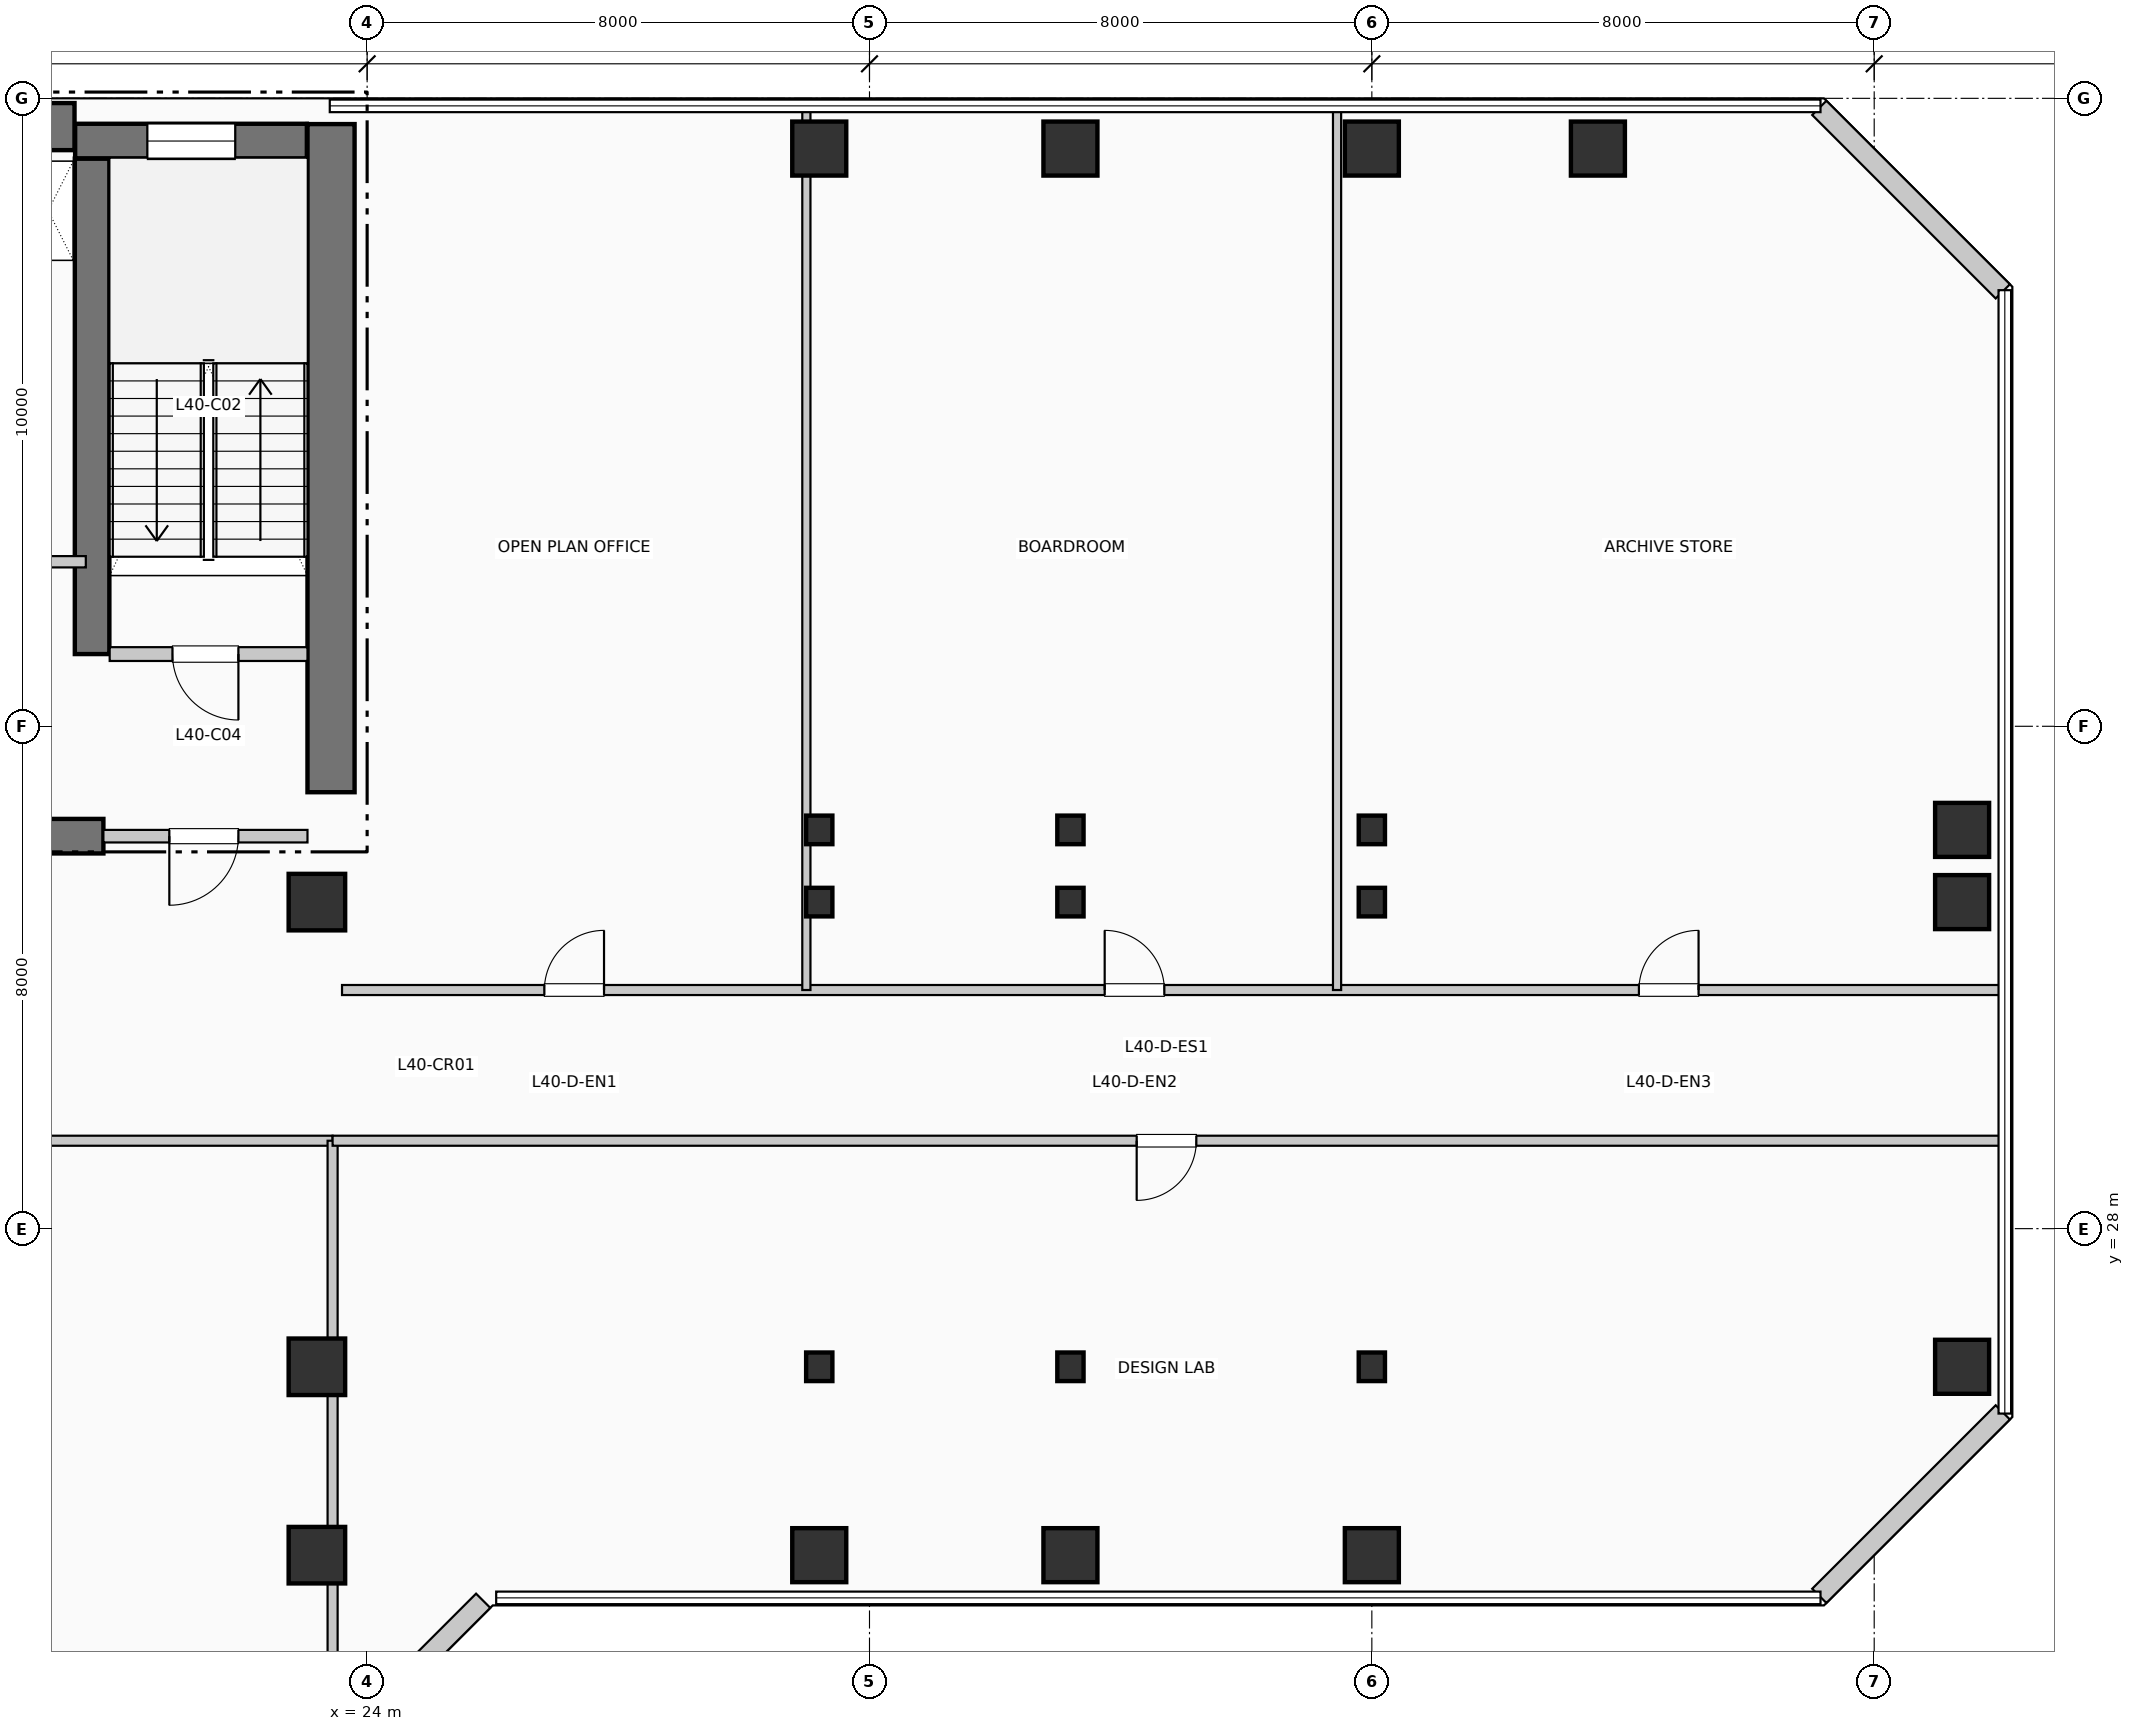
"""IFC4 building model, lengths in metres.
Left out: names, types, materials, properties, quantities, classifications, styles, units other than length and angle.
Written with IfcOpenShell. Run it as: python <this file> out.ifc"""

import sys

from ifc_helpers import new_model, si_unit, direction, frame, frame_2d, origin, origin_2d, place, context, subcontext, project, spatial, rectangle, i_section, extrude, element, fill, save


model = new_model("IFC4")
c1 = context("Model", 3, precision=1e-05, world=origin(), true_north=direction((0.0, 1.0)))
c2 = subcontext(c1, "Body", "Model", "MODEL_VIEW")
j1 = project(units=[si_unit("LENGTHUNIT", "METRE"), si_unit("PLANEANGLEUNIT", "RADIAN")], contexts=[c1])
p1 = place(None, origin())
s1 = spatial("IfcSite", under=j1, at=p1, CompositionType="ELEMENT")
p2 = place(p1, origin())
s2 = spatial("IfcBuilding", under=s1, at=p2, CompositionType="ELEMENT")
p3 = place(p2, frame((0.0, 0.0, 166.65)))
s3 = spatial("IfcBuildingStorey", under=s2, at=p3, CompositionType="ELEMENT", Elevation=166.65)
p4 = place(p3, frame((5.36, 45.55, 0.0), z_axis=(0.0, 0.0, 1.0), x_axis=(1.0, 0.0, 0.0)))
e1 = element("IfcWall", 1, at=p4, inside=s3, PredefinedType="SHEAR", context=c2, shape_type="SweptSolid", body=[
    extrude(rectangle(XDim=13.98, YDim=0.75, at=frame_2d((6.99, 0.0))), origin(), (0.0, 0.0, 1.0), 3.96),
])
p5 = place(p3, frame((23.425, 34.95, 0.0), z_axis=(0.0, 0.0, 1.0), x_axis=(0.0, 1.0, 0.0)))
e2 = element("IfcWall", 2, at=p5, inside=s3, PredefinedType="SHEAR", context=c2, shape_type="SweptSolid", body=[
    extrude(rectangle(XDim=10.64, YDim=0.75, at=frame_2d((5.32, 0.0))), origin(), (0.0, 0.0, 1.0), 3.96),
])
p6 = place(p3, frame((13.68, 34.25, 0.0), z_axis=(0.0, 0.0, 1.0), x_axis=(1.0, 0.0, 0.0)))
e3 = element("IfcWall", 3, at=p6, inside=s3, PredefinedType="SHEAR", context=c2, shape_type="SweptSolid", body=[
    extrude(rectangle(XDim=6.12, YDim=0.55, at=frame_2d((3.06, 0.0))), origin(), (0.0, 0.0, 1.0), 3.96),
])
p7 = place(p3, frame((19.62, 37.15, 0.0), z_axis=(0.0, 0.0, 1.0), x_axis=(0.0, 1.0, 0.0)))
e4 = element("IfcWall", 4, at=p7, inside=s3, PredefinedType="SHEAR", context=c2, shape_type="SweptSolid", body=[
    extrude(rectangle(XDim=7.89, YDim=0.55, at=frame_2d((3.945, 0.0))), origin(), (0.0, 0.0, 1.0), 3.96),
])
p8 = place(p3, frame((19.35, 45.32, 0.0), z_axis=(0.0, 0.0, 1.0), x_axis=(1.0, 0.0, 0.0)))
e5 = element("IfcWall", 5, at=p8, inside=s3, PredefinedType="SHEAR", context=c2, shape_type="SweptSolid", body=[
    extrude(rectangle(XDim=3.69, YDim=0.55, at=frame_2d((1.845, 0.0))), origin(), (0.0, 0.0, 1.0), 3.96),
])
p9 = place(p8, frame((1.15, 0.0, 1.05)))
e6 = element("IfcOpeningElement", 6, at=p9, cuts=e5, PredefinedType="OPENING", context=c2, shape_type="SweptSolid", body=[
    extrude(rectangle(XDim=1.4, YDim=1.8, at=frame_2d((0.7, 0.9))), frame((0.0, 0.285, 0.0), z_axis=(0.0, -1.0, 0.0), x_axis=(1.0, 0.0, 0.0)), (0.0, 0.0, 1.0), 0.57),
])
for number, where, z_axis, x_axis in (
    (7, (23.2, 22.8, 0.0), (0.0, 0.0, 1.0), (1.0, 0.0, 0.0)),
    (8, (23.2, 25.8, 0.0), (0.0, 0.0, 1.0), (1.0, 0.0, 0.0)),
    (9, (23.2, 33.2, 0.0), (0.0, 0.0, 1.0), (1.0, 0.0, 0.0)),
):
    element("IfcColumn", number, at=place(p3, frame(where, z_axis=z_axis, x_axis=x_axis)), inside=s3, PredefinedType="COLUMN", context=c2, shape_type="SweptSolid", body=[
        extrude(rectangle(XDim=0.9, YDim=0.9, at=origin_2d()), origin(), (0.0, 0.0, 1.0), 3.96),
    ])
p10 = place(p3, frame((31.2, 22.8, 0.0), z_axis=(0.0, 0.0, 1.0), x_axis=(1.0, 0.0, 0.0)))
e10 = element("IfcColumn", 10, at=p10, inside=s3, PredefinedType="COLUMN", context=c2, shape_type="SweptSolid", body=[
    extrude(rectangle(XDim=0.86, YDim=0.86, at=origin_2d()), origin(), (0.0, 0.0, 1.0), 3.96),
])
for number, where, z_axis, x_axis in (
    (11, (31.2, 25.8, 0.0), (0.0, 0.0, 1.0), (1.0, 0.0, 0.0)),
    (12, (31.2, 33.2, 0.0), (0.0, 0.0, 1.0), (1.0, 0.0, 0.0)),
    (13, (31.2, 34.35, 0.0), (0.0, 0.0, 1.0), (1.0, 0.0, 0.0)),
):
    element("IfcColumn", number, at=place(p3, frame(where, z_axis=z_axis, x_axis=x_axis)), inside=s3, PredefinedType="COLUMN", context=c2, shape_type="SweptSolid", body=[
        extrude(i_section(OverallWidth=0.418, OverallDepth=0.455, WebThickness=0.032, FlangeThickness=0.051, at=origin_2d()), origin(), (0.0, 0.0, 1.0), 3.96),
    ])
for number, where, z_axis, x_axis in (
    (14, (31.2, 45.2, 0.0), (0.0, 0.0, 1.0), (1.0, 0.0, 0.0)),
    (15, (35.2, 22.8, 0.0), (0.0, 0.0, 1.0), (1.0, 0.0, 0.0)),
):
    element("IfcColumn", number, at=place(p3, frame(where, z_axis=z_axis, x_axis=x_axis)), inside=s3, PredefinedType="COLUMN", context=c2, shape_type="SweptSolid", body=[
        extrude(rectangle(XDim=0.86, YDim=0.86, at=origin_2d()), origin(), (0.0, 0.0, 1.0), 3.96),
    ])
for number, where, z_axis, x_axis in (
    (16, (35.2, 25.8, 0.0), (0.0, 0.0, 1.0), (1.0, 0.0, 0.0)),
    (17, (35.2, 33.2, 0.0), (0.0, 0.0, 1.0), (1.0, 0.0, 0.0)),
    (18, (35.2, 34.35, 0.0), (0.0, 0.0, 1.0), (1.0, 0.0, 0.0)),
):
    element("IfcColumn", number, at=place(p3, frame(where, z_axis=z_axis, x_axis=x_axis)), inside=s3, PredefinedType="COLUMN", context=c2, shape_type="SweptSolid", body=[
        extrude(i_section(OverallWidth=0.418, OverallDepth=0.455, WebThickness=0.032, FlangeThickness=0.051, at=origin_2d()), origin(), (0.0, 0.0, 1.0), 3.96),
    ])
for number, where, z_axis, x_axis in (
    (19, (35.2, 45.2, 0.0), (0.0, 0.0, 1.0), (1.0, 0.0, 0.0)),
    (20, (40.0, 22.8, 0.0), (0.0, 0.0, 1.0), (1.0, 0.0, 0.0)),
):
    element("IfcColumn", number, at=place(p3, frame(where, z_axis=z_axis, x_axis=x_axis)), inside=s3, PredefinedType="COLUMN", context=c2, shape_type="SweptSolid", body=[
        extrude(rectangle(XDim=0.86, YDim=0.86, at=origin_2d()), origin(), (0.0, 0.0, 1.0), 3.96),
    ])
for number, where, z_axis, x_axis in (
    (21, (40.0, 25.8, 0.0), (0.0, 0.0, 1.0), (1.0, 0.0, 0.0)),
    (22, (40.0, 33.2, 0.0), (0.0, 0.0, 1.0), (1.0, 0.0, 0.0)),
    (23, (40.0, 34.35, 0.0), (0.0, 0.0, 1.0), (1.0, 0.0, 0.0)),
):
    element("IfcColumn", number, at=place(p3, frame(where, z_axis=z_axis, x_axis=x_axis)), inside=s3, PredefinedType="COLUMN", context=c2, shape_type="SweptSolid", body=[
        extrude(i_section(OverallWidth=0.418, OverallDepth=0.455, WebThickness=0.032, FlangeThickness=0.051, at=origin_2d()), origin(), (0.0, 0.0, 1.0), 3.96),
    ])
for number, where, z_axis, x_axis in (
    (24, (40.0, 45.2, 0.0), (0.0, 0.0, 1.0), (1.0, 0.0, 0.0)),
    (25, (43.6, 45.2, 0.0), (0.0, 0.0, 1.0), (1.0, 0.0, 0.0)),
    (26, (49.4, 25.8, 0.0), (0.0, 0.0, 1.0), (1.0, 0.0, 0.0)),
    (27, (49.4, 33.2, 0.0), (0.0, 0.0, 1.0), (1.0, 0.0, 0.0)),
    (28, (49.4, 34.35, 0.0), (0.0, 0.0, 1.0), (1.0, 0.0, 0.0)),
):
    element("IfcColumn", number, at=place(p3, frame(where, z_axis=z_axis, x_axis=x_axis)), inside=s3, PredefinedType="COLUMN", context=c2, shape_type="SweptSolid", body=[
        extrude(rectangle(XDim=0.86, YDim=0.86, at=origin_2d()), origin(), (0.0, 0.0, 1.0), 3.96),
    ])
p11 = place(p3, frame((23.926, 20.152, 0.0), z_axis=(0.0, 0.0, 1.0), x_axis=(0.707106781187, 0.707106781187, 0.0)))
e29 = element("IfcWall", 29, at=p11, inside=s3, PredefinedType="SOLIDWALL", context=c2, shape_type="SweptSolid", body=[
    extrude(rectangle(XDim=2.718, YDim=0.32, at=frame_2d((1.359, 0.0))), origin(), (0.0, 0.0, 1.0), 3.71),
])
for number, where, z_axis, x_axis in (
    (30, (47.126, 22.152, 0.0), (0.0, 0.0, 1.0), (0.707, 0.707, 0.0)),
    (31, (50.048, 42.926, 0.0), (0.0, 0.0, 1.0), (-0.707, 0.707, 0.0)),
):
    element("IfcWall", number, at=place(p3, frame(where, z_axis=z_axis, x_axis=x_axis)), inside=s3, PredefinedType="SOLIDWALL", context=c2, shape_type="SweptSolid", body=[
        extrude(rectangle(XDim=4.133, YDim=0.32, at=frame_2d((2.066, 0.0))), origin(), (0.0, 0.0, 1.0), 3.71),
    ])
p12 = place(p3, frame((19.9, 37.15, 0.0), z_axis=(0.0, 0.0, 1.0), x_axis=(1.0, 0.0, 0.0)))
e32 = element("IfcWall", 32, at=p12, inside=s3, PredefinedType="PARTITIONING", context=c2, shape_type="SweptSolid", body=[
    extrude(rectangle(XDim=3.15, YDim=0.22, at=frame_2d((1.575, 0.0))), origin(), (0.0, 0.0, 1.0), 3.71),
])
p13 = place(p12, frame((2.05, 0.0, 0.0), z_axis=(0.0, 0.0, 1.0), x_axis=(-1.0, 0.0, 0.0)))
e33 = element("IfcOpeningElement", 33, at=p13, cuts=e32, PredefinedType="OPENING", context=c2, shape_type="SweptSolid", body=[
    extrude(rectangle(XDim=1.05, YDim=2.15, at=frame_2d((0.525, 1.075))), frame((0.0, 0.12, 0.0), z_axis=(0.0, -1.0, 0.0), x_axis=(1.0, 0.0, 0.0)), (0.0, 0.0, 1.0), 0.24),
])
p14 = place(p3, frame((19.8, 34.25, 0.0), z_axis=(0.0, 0.0, 1.0), x_axis=(1.0, 0.0, 0.0)))
e34 = element("IfcWall", 34, at=p14, inside=s3, PredefinedType="PARTITIONING", context=c2, shape_type="SweptSolid", body=[
    extrude(rectangle(XDim=3.25, YDim=0.2, at=frame_2d((1.625, 0.0))), origin(), (0.0, 0.0, 1.0), 3.71),
])
p15 = place(p14, frame((2.15, 0.0, 0.0), z_axis=(0.0, 0.0, 1.0), x_axis=(-1.0, 0.0, 0.0)))
e35 = element("IfcOpeningElement", 35, at=p15, cuts=e34, PredefinedType="OPENING", context=c2, shape_type="SweptSolid", body=[
    extrude(rectangle(XDim=1.1, YDim=2.15, at=frame_2d((0.55, 1.075))), frame((0.0, 0.11, 0.0), z_axis=(0.0, -1.0, 0.0), x_axis=(1.0, 0.0, 0.0)), (0.0, 0.0, 1.0), 0.22),
])
p16 = place(p3, frame((17.68, 38.62, 0.0), z_axis=(0.0, 0.0, 1.0), x_axis=(1.0, 0.0, 0.0)))
e36 = element("IfcWall", 36, at=p16, inside=s3, PredefinedType="PARTITIONING", context=c2, shape_type="SweptSolid", body=[
    extrude(rectangle(XDim=1.84, YDim=0.18, at=frame_2d((0.92, 0.0))), origin(), (0.0, 0.0, 1.0), 3.71),
])
p17 = place(p16, frame((0.24, 0.0, 0.0)))
e37 = element("IfcOpeningElement", 37, at=p17, cuts=e36, PredefinedType="OPENING", context=c2, shape_type="SweptSolid", body=[
    extrude(rectangle(XDim=0.92, YDim=2.1, at=frame_2d((0.46, 1.05))), frame((0.0, 0.1, 0.0), z_axis=(0.0, -1.0, 0.0), x_axis=(1.0, 0.0, 0.0)), (0.0, 0.0, 1.0), 0.2),
])
p18 = place(p3, frame((16.64, 29.4, 0.0), z_axis=(0.0, 0.0, 1.0), x_axis=(1.0, 0.0, 0.0)))
e38 = element("IfcWall", 38, at=p18, inside=s3, PredefinedType="PARTITIONING", context=c2, shape_type="SweptSolid", body=[
    extrude(rectangle(XDim=6.81, YDim=0.16, at=frame_2d((3.405, 0.0))), origin(), (0.0, 0.0, 1.0), 3.71),
])
p19 = place(p3, frame((23.45, 0.19, 0.0), z_axis=(0.0, 0.0, 1.0), x_axis=(0.0, 1.0, 0.0)))
e39 = element("IfcWall", 39, at=p19, inside=s3, PredefinedType="PARTITIONING", context=c2, shape_type="SweptSolid", body=[
    extrude(rectangle(XDim=29.21, YDim=0.16, at=frame_2d((14.605, 0.0))), origin(), (0.0, 0.0, 1.0), 3.045),
])
p20 = place(p3, frame((23.45, 29.4, 0.0), z_axis=(0.0, 0.0, 1.0), x_axis=(1.0, 0.0, 0.0)))
e40 = element("IfcWall", 40, at=p20, inside=s3, PredefinedType="PARTITIONING", context=c2, shape_type="SweptSolid", body=[
    extrude(rectangle(XDim=26.56, YDim=0.16, at=frame_2d((13.28, 0.0))), origin(), (0.0, 0.0, 1.0), 3.365),
])
p21 = place(p20, frame((13.755, 0.0, 0.0), z_axis=(0.0, 0.0, 1.0), x_axis=(-1.0, 0.0, 0.0)))
e41 = element("IfcOpeningElement", 41, at=p21, cuts=e40, PredefinedType="OPENING", context=c2, shape_type="SweptSolid", body=[
    extrude(rectangle(XDim=0.95, YDim=2.15, at=frame_2d((0.475, 1.075))), frame((0.0, 0.09, 0.0), z_axis=(0.0, -1.0, 0.0), x_axis=(1.0, 0.0, 0.0)), (0.0, 0.0, 1.0), 0.18),
])
p22 = place(p3, frame((23.6, 31.8, 0.0), z_axis=(0.0, 0.0, 1.0), x_axis=(1.0, 0.0, 0.0)))
e42 = element("IfcWall", 42, at=p22, inside=s3, PredefinedType="PARTITIONING", context=c2, shape_type="SweptSolid", body=[
    extrude(rectangle(XDim=26.41, YDim=0.16, at=frame_2d((13.205, 0.0))), origin(), (0.0, 0.0, 1.0), 3.71),
])
p23 = place(p22, frame((3.222, 0.0, 0.0)))
e43 = element("IfcOpeningElement", 43, at=p23, cuts=e42, PredefinedType="OPENING", context=c2, shape_type="SweptSolid", body=[
    extrude(rectangle(XDim=0.95, YDim=2.15, at=frame_2d((0.475, 1.075))), frame((0.0, 0.09, 0.0), z_axis=(0.0, -1.0, 0.0), x_axis=(1.0, 0.0, 0.0)), (0.0, 0.0, 1.0), 0.18),
])
p24 = place(p22, frame((12.146, 0.0, 0.0)))
e44 = element("IfcOpeningElement", 44, at=p24, cuts=e42, PredefinedType="OPENING", context=c2, shape_type="SweptSolid", body=[
    extrude(rectangle(XDim=0.95, YDim=2.15, at=frame_2d((0.475, 1.075))), frame((0.0, 0.09, 0.0), z_axis=(0.0, -1.0, 0.0), x_axis=(1.0, 0.0, 0.0)), (0.0, 0.0, 1.0), 0.18),
])
p25 = place(p22, frame((20.653, 0.0, 0.0)))
e45 = element("IfcOpeningElement", 45, at=p25, cuts=e42, PredefinedType="OPENING", context=c2, shape_type="SweptSolid", body=[
    extrude(rectangle(XDim=0.95, YDim=2.15, at=frame_2d((0.475, 1.075))), frame((0.0, 0.09, 0.0), z_axis=(0.0, -1.0, 0.0), x_axis=(1.0, 0.0, 0.0)), (0.0, 0.0, 1.0), 0.18),
])
p26 = place(p3, frame((30.995, 31.8, 0.0), z_axis=(0.0, 0.0, 1.0), x_axis=(0.0, 1.0, 0.0)))
e46 = element("IfcWall", 46, at=p26, inside=s3, PredefinedType="PARTITIONING", context=c2, shape_type="SweptSolid", body=[
    extrude(rectangle(XDim=14.01, YDim=0.13, at=frame_2d((7.005, 0.0))), origin(), (0.0, 0.0, 1.0), 3.045),
])
p27 = place(p3, frame((39.446, 31.8, 0.0), z_axis=(0.0, 0.0, 1.0), x_axis=(0.0, 1.0, 0.0)))
e47 = element("IfcWall", 47, at=p27, inside=s3, PredefinedType="PARTITIONING", context=c2, shape_type="SweptSolid", body=[
    extrude(rectangle(XDim=14.01, YDim=0.13, at=frame_2d((7.005, 0.0))), origin(), (0.0, 0.0, 1.0), 3.71),
])
p28 = place(p9, origin())
e48 = element("IfcWindow", 48, at=p28, inside=s3, PartitioningType="SINGLE_PANEL", PredefinedType="WINDOW", context=c2, shape_type="SweptSolid", body=[
    extrude(rectangle(XDim=1.4, YDim=1.8, at=frame_2d((0.7, 0.9))), frame((0.0, 0.03, 0.0), z_axis=(0.0, -1.0, 0.0), x_axis=(1.0, 0.0, 0.0)), (0.0, 0.0, 1.0), 0.06),
])
fill(e6, e48)
p29 = place(p13, origin())
e49 = element("IfcDoor", 49, at=p29, inside=s3, OperationType="SINGLE_SWING_RIGHT", PredefinedType="DOOR", context=c2, shape_type="SweptSolid", body=[
    extrude(rectangle(XDim=1.05, YDim=2.15, at=frame_2d((0.525, 1.075))), frame((0.0, 0.025, 0.0), z_axis=(0.0, -1.0, 0.0), x_axis=(1.0, 0.0, 0.0)), (0.0, 0.0, 1.0), 0.05),
])
fill(e33, e49)
p30 = place(p15, origin())
e50 = element("IfcDoor", 50, at=p30, inside=s3, OperationType="SINGLE_SWING_LEFT", PredefinedType="DOOR", context=c2, shape_type="SweptSolid", body=[
    extrude(rectangle(XDim=1.1, YDim=2.15, at=frame_2d((0.55, 1.075))), frame((0.0, 0.025, 0.0), z_axis=(0.0, -1.0, 0.0), x_axis=(1.0, 0.0, 0.0)), (0.0, 0.0, 1.0), 0.05),
])
fill(e35, e50)
p31 = place(p21, origin())
e51 = element("IfcDoor", 51, at=p31, inside=s3, OperationType="SINGLE_SWING_LEFT", PredefinedType="DOOR", context=c2, shape_type="SweptSolid", body=[
    extrude(rectangle(XDim=0.95, YDim=2.15, at=frame_2d((0.475, 1.075))), frame((0.0, 0.025, 0.0), z_axis=(0.0, -1.0, 0.0), x_axis=(1.0, 0.0, 0.0)), (0.0, 0.0, 1.0), 0.05),
])
fill(e41, e51)
p32 = place(p23, origin())
e52 = element("IfcDoor", 52, at=p32, inside=s3, OperationType="SINGLE_SWING_RIGHT", PredefinedType="DOOR", context=c2, shape_type="SweptSolid", body=[
    extrude(rectangle(XDim=0.95, YDim=2.15, at=frame_2d((0.475, 1.075))), frame((0.0, 0.025, 0.0), z_axis=(0.0, -1.0, 0.0), x_axis=(1.0, 0.0, 0.0)), (0.0, 0.0, 1.0), 0.05),
])
fill(e43, e52)
p33 = place(p24, origin())
e53 = element("IfcDoor", 53, at=p33, inside=s3, OperationType="SINGLE_SWING_LEFT", PredefinedType="DOOR", context=c2, shape_type="SweptSolid", body=[
    extrude(rectangle(XDim=0.95, YDim=2.15, at=frame_2d((0.475, 1.075))), frame((0.0, 0.025, 0.0), z_axis=(0.0, -1.0, 0.0), x_axis=(1.0, 0.0, 0.0)), (0.0, 0.0, 1.0), 0.05),
])
fill(e44, e53)
p34 = place(p25, origin())
e54 = element("IfcDoor", 54, at=p34, inside=s3, OperationType="SINGLE_SWING_RIGHT", PredefinedType="DOOR", context=c2, shape_type="SweptSolid", body=[
    extrude(rectangle(XDim=0.95, YDim=2.15, at=frame_2d((0.475, 1.075))), frame((0.0, 0.025, 0.0), z_axis=(0.0, -1.0, 0.0), x_axis=(1.0, 0.0, 0.0)), (0.0, 0.0, 1.0), 0.05),
])
fill(e45, e54)
save(model, sys.argv[1])
